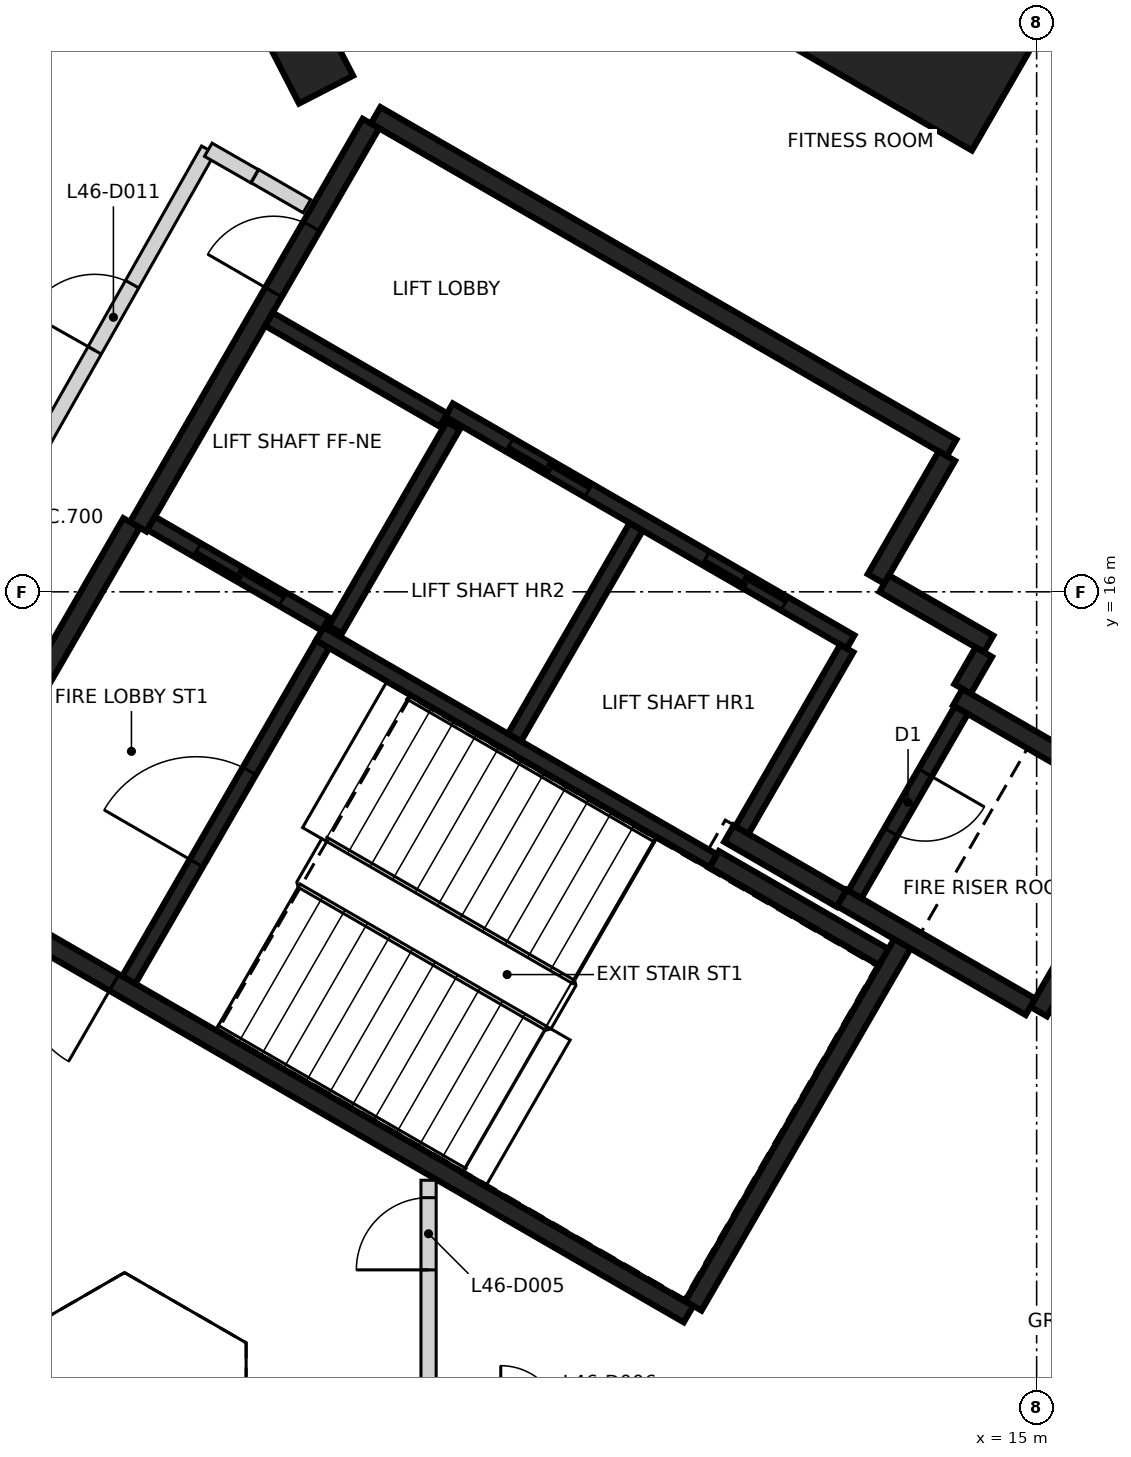
"""IFC4 building model, lengths in metres.
Left out: names, types, materials, properties, quantities, classifications, styles, units other than length and angle.
Written with IfcOpenShell. Run it as: python <this file> out.ifc"""

import sys

from ifc_helpers import new_model, si_unit, direction, frame, frame_2d, origin, origin_2d, place, context, subcontext, project, spatial, rectangle, extrude, element, fill, save


model = new_model("IFC4")
c1 = context("Model", 3, precision=1e-05, world=origin(), true_north=direction((0.0, 1.0)))
c2 = subcontext(c1, "Body", "Model", "MODEL_VIEW")
j1 = project(units=[si_unit("LENGTHUNIT", "METRE"), si_unit("PLANEANGLEUNIT", "RADIAN")], contexts=[c1])
p1 = place(None, origin())
s1 = spatial("IfcSite", under=j1, at=p1, CompositionType="ELEMENT")
p2 = place(p1, origin())
s2 = spatial("IfcBuilding", under=s1, at=p2, CompositionType="ELEMENT")
p3 = place(p2, frame((0.0, 0.0, 186.4)))
s3 = spatial("IfcBuildingStorey", under=s2, at=p3, CompositionType="ELEMENT", Elevation=186.4)
p4 = place(p3, frame((5.388, 23.118, -0.35), z_axis=(0.0, 0.0, 1.0), x_axis=(-0.457548042569, 0.889184901323, 0.0)))
e1 = element("IfcColumn", 1, at=p4, inside=s3, PredefinedType="COLUMN", context=c2, shape_type="SweptSolid", body=[
    extrude(rectangle(XDim=1.15, YDim=0.8, at=origin_2d()), origin(), (0.0, 0.0, 1.0), 3.6),
])
p5 = place(p3, frame((13.78, 23.867, -0.35), z_axis=(0.0, 0.0, 1.0), x_axis=(0.5, 0.866025403784, 0.0)))
e2 = element("IfcColumn", 2, at=p5, inside=s3, PredefinedType="COLUMN", context=c2, shape_type="SweptSolid", body=[
    extrude(rectangle(XDim=3.2, YDim=2.7, at=origin_2d()), origin(), (0.0, 0.0, 1.0), 3.6),
])
p6 = place(p3, frame((10.42, 6.498, 0.0), z_axis=(0.0, 0.0, 1.0), x_axis=(-0.866021906294, 0.500006057782, 0.0)))
e3 = element("IfcWall", 3, at=p6, inside=s3, PredefinedType="SHEAR", context=c2, shape_type="SweptSolid", body=[
    extrude(rectangle(XDim=11.55, YDim=0.25, at=frame_2d((5.775, 0.0))), origin(), (0.0, 0.0, 1.0), 3.25),
])
p7 = place(p6, frame((10.025, 0.0, 0.0)))
e4 = element("IfcOpeningElement", 4, at=p7, cuts=e3, PredefinedType="OPENING", context=c2, shape_type="SweptSolid", body=[
    extrude(rectangle(XDim=1.2, YDim=2.1, at=frame_2d((0.6, 1.05))), frame((0.0, 0.135, 0.0), z_axis=(0.0, -1.0, 0.0), x_axis=(1.0, 0.0, 0.0)), (0.0, 0.0, 1.0), 0.27),
])
p8 = place(p6, frame((8.725, 0.0, 0.0)))
e5 = element("IfcOpeningElement", 5, at=p8, cuts=e3, PredefinedType="OPENING", context=c2, shape_type="SweptSolid", body=[
    extrude(rectangle(XDim=1.2, YDim=2.1, at=frame_2d((0.6, 1.05))), frame((0.0, 0.135, 0.0), z_axis=(0.0, -1.0, 0.0), x_axis=(1.0, 0.0, 0.0)), (0.0, 0.0, 1.0), 0.27),
])
p9 = place(p3, frame((6.304, 22.269, 0.0), z_axis=(0.0, 0.0, 1.0), x_axis=(0.866022959057, -0.500004234368, 0.0)))
e6 = element("IfcWall", 6, at=p9, inside=s3, PredefinedType="SHEAR", context=c2, shape_type="SweptSolid", body=[
    extrude(rectangle(XDim=8.75, YDim=0.25, at=frame_2d((4.375, 0.0))), origin(), (0.0, 0.0, 1.0), 3.25),
])
p10 = place(p3, frame((3.179, 16.856, 0.0), z_axis=(0.0, 0.0, 1.0), x_axis=(0.500001955336, 0.866024274868, 0.0)))
e7 = element("IfcWall", 7, at=p10, inside=s3, PredefinedType="SHEAR", context=c2, shape_type="SweptSolid", body=[
    extrude(rectangle(XDim=6.125, YDim=0.25, at=frame_2d((3.062, 0.0))), origin(), (0.0, 0.0, 1.0), 3.25),
])
p11 = place(p10, frame((3.563, 0.0, 0.0)))
e8 = element("IfcOpeningElement", 8, at=p11, cuts=e7, PredefinedType="OPENING", context=c2, shape_type="SweptSolid", body=[
    extrude(rectangle(XDim=1.0, YDim=2.1, at=frame_2d((0.5, 1.05))), frame((0.0, 0.135, 0.0), z_axis=(0.0, -1.0, 0.0), x_axis=(1.0, 0.0, 0.0)), (0.0, 0.0, 1.0), 0.27),
])
p12 = place(p3, frame((0.48, 12.381, 0.0), z_axis=(0.0, 0.0, 1.0), x_axis=(0.49999885962, 0.866026062182, 0.0)))
e9 = element("IfcWall", 9, at=p12, inside=s3, PredefinedType="SHEAR", context=c2, shape_type="SweptSolid", body=[
    extrude(rectangle(XDim=5.225, YDim=0.25, at=frame_2d((2.612, 0.0))), origin(), (0.0, 0.0, 1.0), 3.25),
])
p13 = place(p3, frame((13.238, 11.378, 0.0), z_axis=(0.0, 0.0, 1.0), x_axis=(-0.500008851346, -0.866020293397, 0.0)))
e10 = element("IfcWall", 10, at=p13, inside=s3, PredefinedType="SHEAR", context=c2, shape_type="SweptSolid", body=[
    extrude(rectangle(XDim=5.51, YDim=0.25, at=frame_2d((2.755, 0.0))), origin(), (0.0, 0.0, 1.0), 3.25),
])
p14 = place(p3, frame((16.552, 13.119, 0.0), z_axis=(0.0, 0.0, 1.0), x_axis=(-0.499978833458, -0.866037623948, 0.0)))
e11 = element("IfcWall", 11, at=p14, inside=s3, PredefinedType="SHEAR", context=c2, shape_type="SweptSolid", body=[
    extrude(rectangle(XDim=3.05, YDim=0.25, at=frame_2d((1.525, 0.0))), origin(), (0.0, 0.0, 1.0), 3.25),
])
p15 = place(p3, frame((14.918, 10.54, 0.0), z_axis=(0.0, 0.0, 1.0), x_axis=(-0.866063538972, 0.499933942099, 0.0)))
e12 = element("IfcWall", 12, at=p15, inside=s3, PredefinedType="SHEAR", context=c2, shape_type="SweptSolid", body=[
    extrude(rectangle(XDim=2.865, YDim=0.25, at=frame_2d((1.432, 0.0))), origin(), (0.0, 0.0, 1.0), 3.25),
])
p16 = place(p3, frame((13.963, 14.614, 0.0), z_axis=(0.0, 0.0, 1.0), x_axis=(0.866042235819, -0.499970844928, 0.0)))
e13 = element("IfcWall", 13, at=p16, inside=s3, PredefinedType="SHEAR", context=c2, shape_type="SweptSolid", body=[
    extrude(rectangle(XDim=2.865, YDim=0.25, at=frame_2d((1.432, 0.0))), origin(), (0.0, 0.0, 1.0), 3.25),
])
p17 = place(p3, frame((10.757, 12.481, 0.0), z_axis=(0.0, 0.0, 1.0), x_axis=(0.866022940537, -0.500004266446, 0.0)))
e14 = element("IfcWall", 14, at=p17, inside=s3, PredefinedType="SHEAR", context=c2, shape_type="SweptSolid", body=[
    extrude(rectangle(XDim=2.575, YDim=0.25, at=frame_2d((1.287, 0.0))), origin(), (0.0, 0.0, 1.0), 3.25),
])
p18 = place(p3, frame((13.819, 17.785, 0.0), z_axis=(0.0, 0.0, 1.0), x_axis=(-0.500039802285, -0.866002422705, 0.0)))
e15 = element("IfcWall", 15, at=p18, inside=s3, PredefinedType="SHEAR", context=c2, shape_type="SweptSolid", body=[
    extrude(rectangle(XDim=1.865, YDim=0.25, at=frame_2d((0.932, 0.0))), origin(), (0.0, 0.0, 1.0), 3.25),
])
p19 = place(p3, frame((12.433, 11.964, 0.0), z_axis=(0.0, 0.0, 1.0), x_axis=(-0.866038183914, 0.499977863513, 0.0)))
e16 = element("IfcWall", 16, at=p19, inside=s3, PredefinedType="SHEAR", context=c2, shape_type="SweptSolid", body=[
    extrude(rectangle(XDim=1.71, YDim=0.25, at=frame_2d((0.855, 0.0))), origin(), (0.0, 0.0, 1.0), 3.25),
])
p20 = place(p3, frame((12.995, 16.108, 0.0), z_axis=(0.0, 0.0, 1.0), x_axis=(0.866044474677, -0.49996696679, 0.0)))
e17 = element("IfcWall", 17, at=p20, inside=s3, PredefinedType="SHEAR", context=c2, shape_type="SweptSolid", body=[
    extrude(rectangle(XDim=1.584, YDim=0.25, at=frame_2d((0.792, 0.0))), origin(), (0.0, 0.0, 1.0), 3.25),
])
p21 = place(p3, frame((14.305, 15.207, 0.0), z_axis=(0.0, 0.0, 1.0), x_axis=(-0.499848422343, -0.866112899501, 0.0)))
e18 = element("IfcWall", 18, at=p21, inside=s3, PredefinedType="SHEAR", context=c2, shape_type="SweptSolid", body=[
    extrude(rectangle(XDim=0.559, YDim=0.25, at=frame_2d((0.28, 0.0))), origin(), (0.0, 0.0, 1.0), 3.25),
])
p22 = place(p3, frame((12.552, 15.342, 0.0), z_axis=(0.0, 0.0, 1.0), x_axis=(-0.866030299012, 0.499991521122, 0.0)))
e19 = element("IfcWall", 19, at=p22, inside=s3, PredefinedType="SHEAR", context=c2, shape_type="SweptSolid", body=[
    extrude(rectangle(XDim=6.1, YDim=0.2, at=frame_2d((3.05, 0.0))), origin(), (0.0, 0.0, 1.0), 3.25),
])
p23 = place(p22, frame((1.0, 0.0, 0.0)))
e20 = element("IfcOpeningElement", 20, at=p23, cuts=e19, PredefinedType="OPENING", context=c2, shape_type="SweptSolid", body=[
    extrude(rectangle(XDim=1.2, YDim=2.1, at=frame_2d((0.6, 1.05))), frame((0.0, 0.11, 0.0), z_axis=(0.0, -1.0, 0.0), x_axis=(1.0, 0.0, 0.0)), (0.0, 0.0, 1.0), 0.22),
])
p24 = place(p22, frame((3.982, 0.0, 0.0)))
e21 = element("IfcOpeningElement", 21, at=p24, cuts=e19, PredefinedType="OPENING", context=c2, shape_type="SweptSolid", body=[
    extrude(rectangle(XDim=1.2, YDim=2.1, at=frame_2d((0.6, 1.05))), frame((0.0, 0.11, 0.0), z_axis=(0.0, -1.0, 0.0), x_axis=(1.0, 0.0, 0.0)), (0.0, 0.0, 1.0), 0.22),
])
p25 = place(p3, frame((10.743, 12.46, 0.0), z_axis=(0.0, 0.0, 1.0), x_axis=(-0.866018848283, 0.500011354289, 0.0)))
e22 = element("IfcWall", 22, at=p25, inside=s3, PredefinedType="SHEAR", context=c2, shape_type="SweptSolid", body=[
    extrude(rectangle(XDim=5.974, YDim=0.2, at=frame_2d((2.987, 0.0))), origin(), (0.0, 0.0, 1.0), 3.25),
])
p26 = place(p3, frame((3.057, 10.895, 0.0), z_axis=(0.0, 0.0, 1.0), x_axis=(0.500027839223, 0.866009330205, 0.0)))
e23 = element("IfcWall", 23, at=p26, inside=s3, PredefinedType="SHEAR", context=c2, shape_type="SweptSolid", body=[
    extrude(rectangle(XDim=5.098, YDim=0.2, at=frame_2d((2.549, 0.0))), origin(), (0.0, 0.0, 1.0), 3.25),
])
p27 = place(p26, frame((1.774, 0.0, 0.0)))
e24 = element("IfcOpeningElement", 24, at=p27, cuts=e23, PredefinedType="OPENING", context=c2, shape_type="SweptSolid", body=[
    extrude(rectangle(XDim=1.4, YDim=2.1, at=frame_2d((0.7, 1.05))), frame((0.0, 0.11, 0.0), z_axis=(0.0, -1.0, 0.0), x_axis=(1.0, 0.0, 0.0)), (0.0, 0.0, 1.0), 0.22),
])
p28 = place(p3, frame((8.132, 14.084, 0.0), z_axis=(0.0, 0.0, 1.0), x_axis=(0.500030834389, 0.86600760081, 0.0)))
e25 = element("IfcWall", 25, at=p28, inside=s3, PredefinedType="SHEAR", context=c2, shape_type="SweptSolid", body=[
    extrude(rectangle(XDim=3.198, YDim=0.2, at=frame_2d((1.599, 0.0))), origin(), (0.0, 0.0, 1.0), 3.25),
])
p29 = place(p3, frame((14.008, 14.442, 0.0), z_axis=(0.0, 0.0, 1.0), x_axis=(-0.499986818241, -0.866033014143, 0.0)))
e26 = element("IfcWall", 26, at=p29, inside=s3, PredefinedType="SHEAR", context=c2, shape_type="SweptSolid", body=[
    extrude(rectangle(XDim=2.798, YDim=0.2, at=frame_2d((1.399, 0.0))), origin(), (0.0, 0.0, 1.0), 3.25),
])
p30 = place(p29, frame((0.949, 0.0, 0.0)))
e27 = element("IfcOpeningElement", 27, at=p30, cuts=e26, PredefinedType="OPENING", context=c2, shape_type="SweptSolid", body=[
    extrude(rectangle(XDim=0.9, YDim=2.1, at=frame_2d((0.45, 1.05))), frame((0.0, 0.11, 0.0), z_axis=(0.0, -1.0, 0.0), x_axis=(1.0, 0.0, 0.0)), (0.0, 0.0, 1.0), 0.22),
])
p31 = place(p3, frame((12.502, 15.255, 0.0), z_axis=(0.0, 0.0, 1.0), x_axis=(-0.499965018551, -0.866045599391, 0.0)))
e28 = element("IfcWall", 28, at=p31, inside=s3, PredefinedType="SHEAR", context=c2, shape_type="SweptSolid", body=[
    extrude(rectangle(XDim=2.759, YDim=0.2, at=frame_2d((1.379, 0.0))), origin(), (0.0, 0.0, 1.0), 3.25),
])
p32 = place(p3, frame((7.324, 18.187, 0.0), z_axis=(0.0, 0.0, 1.0), x_axis=(-0.499967891604, -0.866043940782, 0.0)))
e29 = element("IfcWall", 29, at=p32, inside=s3, PredefinedType="SHEAR", context=c2, shape_type="SweptSolid", body=[
    extrude(rectangle(XDim=3.1, YDim=0.2, at=frame_2d((1.55, 0.0))), origin(), (0.0, 0.0, 1.0), 3.25),
])
p33 = place(p3, frame((5.646, 15.576, 0.0), z_axis=(0.0, 0.0, 1.0), x_axis=(-0.866018407898, 0.500012117035, 0.0)))
e30 = element("IfcWall", 30, at=p33, inside=s3, PredefinedType="SHEAR", context=c2, shape_type="SweptSolid", body=[
    extrude(rectangle(XDim=2.651, YDim=0.2, at=frame_2d((1.325, 0.0))), origin(), (0.0, 0.0, 1.0), 3.25),
])
p34 = place(p33, frame((0.652, 0.0, 0.0)))
e31 = element("IfcOpeningElement", 31, at=p34, cuts=e30, PredefinedType="OPENING", context=c2, shape_type="SweptSolid", body=[
    extrude(rectangle(XDim=1.3, YDim=2.1, at=frame_2d((0.65, 1.05))), frame((0.0, 0.11, 0.0), z_axis=(0.0, -1.0, 0.0), x_axis=(1.0, 0.0, 0.0)), (0.0, 0.0, 1.0), 0.22),
])
p35 = place(p3, frame((7.196, 18.26, 0.0), z_axis=(0.0, 0.0, 1.0), x_axis=(-0.866018407898, 0.500012117035, 0.0)))
e32 = element("IfcWall", 32, at=p35, inside=s3, PredefinedType="SHEAR", context=c2, shape_type="SweptSolid", body=[
    extrude(rectangle(XDim=2.651, YDim=0.2, at=frame_2d((1.325, 0.0))), origin(), (0.0, 0.0, 1.0), 3.25),
])
p36 = place(p3, frame((-1.085, 12.65, 0.0), z_axis=(0.0, 0.0, 1.0), x_axis=(0.49243456751, 0.870349468157, 0.0)))
e33 = element("IfcWall", 33, at=p36, inside=s3, PredefinedType="PARTITIONING", context=c2, shape_type="SweptSolid", body=[
    extrude(rectangle(XDim=10.531, YDim=0.2, at=frame_2d((5.266, 0.0))), origin(), (0.0, 0.0, 1.0), 3.25),
])
p37 = place(p36, frame((7.499, 0.0, 0.0)))
e34 = element("IfcOpeningElement", 34, at=p37, cuts=e33, PredefinedType="OPENING", context=c2, shape_type="SweptSolid", body=[
    extrude(rectangle(XDim=1.0, YDim=2.1, at=frame_2d((0.5, 1.05))), frame((0.0, 0.11, 0.0), z_axis=(0.0, -1.0, 0.0), x_axis=(1.0, 0.0, 0.0)), (0.0, 0.0, 1.0), 0.22),
])
p38 = place(p3, frame((4.102, 21.816, 0.0), z_axis=(0.0, 0.0, 1.0), x_axis=(0.867664502326, -0.497150189986, 0.0)))
e35 = element("IfcWall", 35, at=p38, inside=s3, PredefinedType="PARTITIONING", context=c2, shape_type="SweptSolid", body=[
    extrude(rectangle(XDim=0.702, YDim=0.2, at=frame_2d((0.351, 0.0))), origin(), (0.0, 0.0, 1.0), 3.25),
])
p39 = place(p3, frame((4.716, 21.468, 0.0), z_axis=(0.0, 0.0, 1.0), x_axis=(0.865912682783, -0.500195187698, 0.0)))
e36 = element("IfcWall", 36, at=p39, inside=s3, PredefinedType="PARTITIONING", context=c2, shape_type="SweptSolid", body=[
    extrude(rectangle(XDim=0.79, YDim=0.2, at=frame_2d((0.395, 0.0))), origin(), (0.0, 0.0, 1.0), 3.25),
])
p40 = place(p3, frame((7.0, -4.966, 0.0), z_axis=(0.0, 0.0, 1.0), x_axis=(0.0, 1.0, 0.0)))
e37 = element("IfcWall", 37, at=p40, inside=s3, PredefinedType="PARTITIONING", context=c2, shape_type="SweptSolid", body=[
    extrude(rectangle(XDim=13.225, YDim=0.2, at=frame_2d((6.612, 0.0))), origin(), (0.0, 0.0, 1.0), 3.25),
])
p41 = place(p40, frame((2.835, 0.0, 0.0)))
e38 = element("IfcOpeningElement", 38, at=p41, cuts=e37, PredefinedType="OPENING", context=c2, shape_type="SweptSolid", body=[
    extrude(rectangle(XDim=1.0, YDim=2.1, at=frame_2d((0.5, 1.05))), frame((0.0, 0.11, 0.0), z_axis=(0.0, -1.0, 0.0), x_axis=(1.0, 0.0, 0.0)), (0.0, 0.0, 1.0), 0.22),
])
p42 = place(p40, frame((12.045, 0.0, 0.0)))
e39 = element("IfcOpeningElement", 39, at=p42, cuts=e37, PredefinedType="OPENING", context=c2, shape_type="SweptSolid", body=[
    extrude(rectangle(XDim=0.95, YDim=2.1, at=frame_2d((0.475, 1.05))), frame((0.0, 0.11, 0.0), z_axis=(0.0, -1.0, 0.0), x_axis=(1.0, 0.0, 0.0)), (0.0, 0.0, 1.0), 0.22),
])
p43 = place(p34, origin())
e40 = element("IfcDoor", 40, at=p43, inside=s3, OperationType="SLIDING_TO_LEFT", PredefinedType="DOOR", context=c2, shape_type="SweptSolid", body=[
    extrude(rectangle(XDim=1.3, YDim=2.1, at=frame_2d((0.65, 1.05))), frame((0.0, 0.025, 0.0), z_axis=(0.0, -1.0, 0.0), x_axis=(1.0, 0.0, 0.0)), (0.0, 0.0, 1.0), 0.05),
])
fill(e31, e40)
p44 = place(p23, origin())
e41 = element("IfcDoor", 41, at=p44, inside=s3, OperationType="DOUBLE_DOOR_SLIDING", PredefinedType="DOOR", context=c2, shape_type="SweptSolid", body=[
    extrude(rectangle(XDim=1.2, YDim=2.1, at=frame_2d((0.6, 1.05))), frame((0.0, 0.025, 0.0), z_axis=(0.0, -1.0, 0.0), x_axis=(1.0, 0.0, 0.0)), (0.0, 0.0, 1.0), 0.05),
])
fill(e20, e41)
p45 = place(p24, origin())
e42 = element("IfcDoor", 42, at=p45, inside=s3, OperationType="DOUBLE_DOOR_SLIDING", PredefinedType="DOOR", context=c2, shape_type="SweptSolid", body=[
    extrude(rectangle(XDim=1.2, YDim=2.1, at=frame_2d((0.6, 1.05))), frame((0.0, 0.025, 0.0), z_axis=(0.0, -1.0, 0.0), x_axis=(1.0, 0.0, 0.0)), (0.0, 0.0, 1.0), 0.05),
])
fill(e21, e42)
p46 = place(p11, origin())
e43 = element("IfcDoor", 43, at=p46, inside=s3, OperationType="SINGLE_SWING_LEFT", PredefinedType="DOOR", context=c2, shape_type="SweptSolid", body=[
    extrude(rectangle(XDim=1.0, YDim=2.1, at=frame_2d((0.5, 1.05))), frame((0.0, 0.025, 0.0), z_axis=(0.0, -1.0, 0.0), x_axis=(1.0, 0.0, 0.0)), (0.0, 0.0, 1.0), 0.05),
])
fill(e8, e43)
p47 = place(p8, origin())
e44 = element("IfcDoor", 44, at=p47, inside=s3, OperationType="SINGLE_SWING_RIGHT", PredefinedType="DOOR", context=c2, shape_type="SweptSolid", body=[
    extrude(rectangle(XDim=1.2, YDim=2.1, at=frame_2d((0.6, 1.05))), frame((0.0, 0.025, 0.0), z_axis=(0.0, -1.0, 0.0), x_axis=(1.0, 0.0, 0.0)), (0.0, 0.0, 1.0), 0.05),
])
fill(e5, e44)
p48 = place(p27, origin())
e45 = element("IfcDoor", 45, at=p48, inside=s3, OperationType="SINGLE_SWING_LEFT", PredefinedType="DOOR", context=c2, shape_type="SweptSolid", body=[
    extrude(rectangle(XDim=1.4, YDim=2.1, at=frame_2d((0.7, 1.05))), frame((0.0, 0.025, 0.0), z_axis=(0.0, -1.0, 0.0), x_axis=(1.0, 0.0, 0.0)), (0.0, 0.0, 1.0), 0.05),
])
fill(e24, e45)
p49 = place(p30, origin())
e46 = element("IfcDoor", 46, at=p49, inside=s3, OperationType="SINGLE_SWING_RIGHT", PredefinedType="DOOR", context=c2, shape_type="SweptSolid", body=[
    extrude(rectangle(XDim=0.9, YDim=2.1, at=frame_2d((0.45, 1.05))), frame((0.0, 0.025, 0.0), z_axis=(0.0, -1.0, 0.0), x_axis=(1.0, 0.0, 0.0)), (0.0, 0.0, 1.0), 0.05),
])
fill(e27, e46)
p50 = place(p42, frame((0.95, 0.0, 0.0), z_axis=(0.0, 0.0, 1.0), x_axis=(-1.0, 0.0, 0.0)))
e47 = element("IfcDoor", 47, at=p50, inside=s3, OperationType="SINGLE_SWING_LEFT", PredefinedType="DOOR", context=c2, shape_type="SweptSolid", body=[
    extrude(rectangle(XDim=0.95, YDim=2.1, at=frame_2d((0.475, 1.05))), frame((0.0, 0.025, 0.0), z_axis=(0.0, -1.0, 0.0), x_axis=(1.0, 0.0, 0.0)), (0.0, 0.0, 1.0), 0.05),
])
fill(e39, e47)
p51 = place(p37, frame((1.0, 0.0, 0.0), z_axis=(0.0, 0.0, 1.0), x_axis=(-1.0, 0.0, 0.0)))
e48 = element("IfcDoor", 48, at=p51, inside=s3, OperationType="SINGLE_SWING_LEFT", PredefinedType="DOOR", context=c2, shape_type="SweptSolid", body=[
    extrude(rectangle(XDim=1.0, YDim=2.1, at=frame_2d((0.5, 1.05))), frame((0.0, 0.025, 0.0), z_axis=(0.0, -1.0, 0.0), x_axis=(1.0, 0.0, 0.0)), (0.0, 0.0, 1.0), 0.05),
])
fill(e34, e48)
save(model, sys.argv[1])
